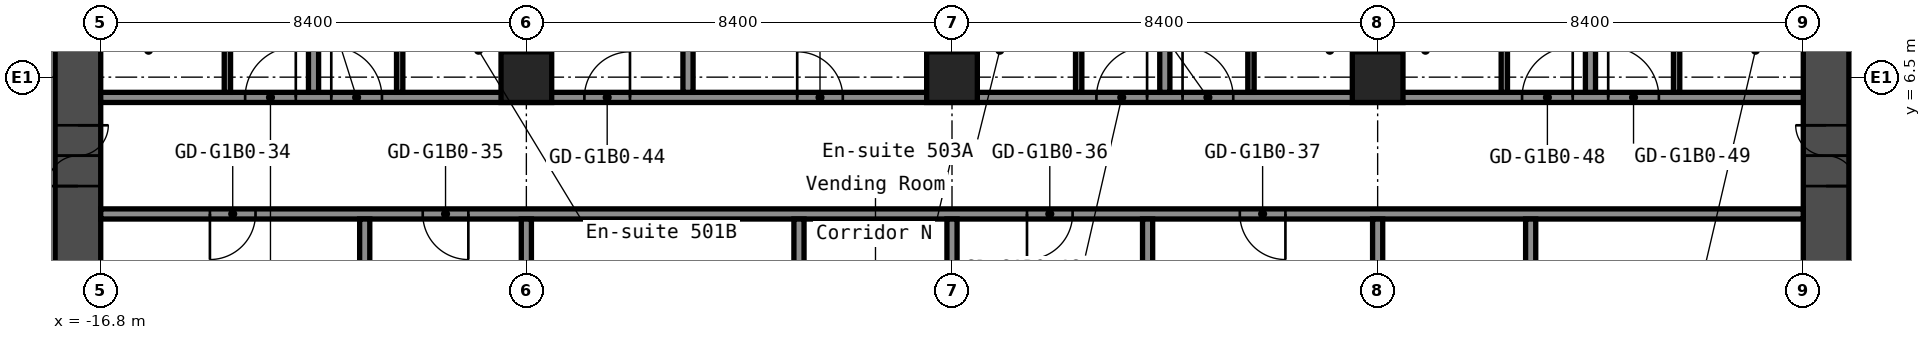
"""IFC4 building model, lengths in metres.
Left out: names, types, materials, properties, quantities, classifications, styles, units other than length and angle.
Written with IfcOpenShell. Run it as: python <this file> out.ifc"""

import sys

from ifc_helpers import new_model, si_unit, direction, frame, frame_2d, origin, origin_2d, place, context, subcontext, project, spatial, rectangle, hollow_rectangle, extrude, element, fill, save


model = new_model("IFC4")
c1 = context("Model", 3, precision=1e-05, world=origin(), true_north=direction((0.0, 1.0)))
c2 = subcontext(c1, "Body", "Model", "MODEL_VIEW")
j1 = project(units=[si_unit("LENGTHUNIT", "METRE"), si_unit("PLANEANGLEUNIT", "RADIAN")], contexts=[c1])
p1 = place(None, origin())
s1 = spatial("IfcSite", under=j1, at=p1, CompositionType="ELEMENT")
p2 = place(p1, origin())
s2 = spatial("IfcBuilding", under=s1, at=p2, CompositionType="ELEMENT")
p3 = place(p2, frame((0.0, 0.0, 23.0)))
s3 = spatial("IfcBuildingStorey", under=s2, at=p3, CompositionType="ELEMENT", Elevation=23.0)
for number, where, z_axis, x_axis in (
    (1, (-8.4, 6.5, 0.0), (0.0, 0.0, 1.0), (1.0, 0.0, 0.0)),
    (2, (0.0, 6.5, 0.0), (0.0, 0.0, 1.0), (1.0, 0.0, 0.0)),
    (3, (8.4, 6.5, 0.0), (0.0, 0.0, 1.0), (1.0, 0.0, 0.0)),
):
    element("IfcColumn", number, at=place(p3, frame(where, z_axis=z_axis, x_axis=x_axis)), inside=s3, PredefinedType="COLUMN", context=c2, shape_type="SweptSolid", body=[
        extrude(hollow_rectangle(XDim=1.0, YDim=1.0, WallThickness=0.04, at=origin_2d()), origin(), (0.0, 0.0, 1.0), 2.8),
    ])
p4 = place(p3, frame((-17.25, -8.4, 0.0), z_axis=(0.0, 0.0, 1.0), x_axis=(0.0, 1.0, 0.0)))
e4 = element("IfcWall", 4, at=p4, inside=s3, PredefinedType="SHEAR", context=c2, shape_type="SweptSolid", body=[
    extrude(rectangle(XDim=16.8, YDim=0.9, at=frame_2d((8.4, 0.0))), origin(), (0.0, 0.0, 1.0), 2.8),
])
p5 = place(p4, frame((12.75, 0.0, 0.0)))
e5 = element("IfcOpeningElement", 5, at=p5, cuts=e4, PredefinedType="OPENING", context=c2, shape_type="SweptSolid", body=[
    extrude(rectangle(XDim=1.2, YDim=2.1, at=frame_2d((0.6, 1.05))), frame((0.0, 0.46, 0.0), z_axis=(0.0, -1.0, 0.0), x_axis=(1.0, 0.0, 0.0)), (0.0, 0.0, 1.0), 0.92),
])
p6 = place(p4, frame((2.85, 0.0, 0.0)))
e6 = element("IfcOpeningElement", 6, at=p6, cuts=e4, PredefinedType="OPENING", context=c2, shape_type="SweptSolid", body=[
    extrude(rectangle(XDim=1.2, YDim=2.1, at=frame_2d((0.6, 1.05))), frame((0.0, 0.46, 0.0), z_axis=(0.0, -1.0, 0.0), x_axis=(1.0, 0.0, 0.0)), (0.0, 0.0, 1.0), 0.92),
])
p7 = place(p3, frame((17.25, -8.4, 0.0), z_axis=(0.0, 0.0, 1.0), x_axis=(0.0, 1.0, 0.0)))
e7 = element("IfcWall", 7, at=p7, inside=s3, PredefinedType="SHEAR", context=c2, shape_type="SweptSolid", body=[
    extrude(rectangle(XDim=16.8, YDim=0.9, at=frame_2d((8.4, 0.0))), origin(), (0.0, 0.0, 1.0), 2.8),
])
p8 = place(p7, frame((12.75, 0.0, 0.0)))
e8 = element("IfcOpeningElement", 8, at=p8, cuts=e7, PredefinedType="OPENING", context=c2, shape_type="SweptSolid", body=[
    extrude(rectangle(XDim=1.2, YDim=2.1, at=frame_2d((0.6, 1.05))), frame((0.0, 0.46, 0.0), z_axis=(0.0, -1.0, 0.0), x_axis=(1.0, 0.0, 0.0)), (0.0, 0.0, 1.0), 0.92),
])
p9 = place(p7, frame((2.85, 0.0, 0.0)))
e9 = element("IfcOpeningElement", 9, at=p9, cuts=e7, PredefinedType="OPENING", context=c2, shape_type="SweptSolid", body=[
    extrude(rectangle(XDim=1.2, YDim=2.1, at=frame_2d((0.6, 1.05))), frame((0.0, 0.46, 0.0), z_axis=(0.0, -1.0, 0.0), x_axis=(1.0, 0.0, 0.0)), (0.0, 0.0, 1.0), 0.92),
])
p10 = place(p3, frame((-16.8, 3.8, 0.0), z_axis=(0.0, 0.0, 1.0), x_axis=(1.0, 0.0, 0.0)))
e10 = element("IfcWall", 10, at=p10, inside=s3, PredefinedType="PARTITIONING", context=c2, shape_type="SweptSolid", body=[
    extrude(rectangle(XDim=33.6, YDim=0.2, at=frame_2d((16.8, 0.0))), origin(), (0.0, 0.0, 1.0), 2.8),
])
p11 = place(p10, frame((2.155, 0.0, 0.0)))
e11 = element("IfcOpeningElement", 11, at=p11, cuts=e10, PredefinedType="OPENING", context=c2, shape_type="SweptSolid", body=[
    extrude(rectangle(XDim=0.9, YDim=2.1, at=frame_2d((0.45, 1.05))), frame((0.0, 0.11, 0.0), z_axis=(0.0, -1.0, 0.0), x_axis=(1.0, 0.0, 0.0)), (0.0, 0.0, 1.0), 0.22),
])
p12 = place(p10, frame((6.355, 0.0, 0.0)))
e12 = element("IfcOpeningElement", 12, at=p12, cuts=e10, PredefinedType="OPENING", context=c2, shape_type="SweptSolid", body=[
    extrude(rectangle(XDim=0.9, YDim=2.1, at=frame_2d((0.45, 1.05))), frame((0.0, 0.11, 0.0), z_axis=(0.0, -1.0, 0.0), x_axis=(1.0, 0.0, 0.0)), (0.0, 0.0, 1.0), 0.22),
])
p13 = place(p10, frame((18.28, 0.0, 0.0)))
e13 = element("IfcOpeningElement", 13, at=p13, cuts=e10, PredefinedType="OPENING", context=c2, shape_type="SweptSolid", body=[
    extrude(rectangle(XDim=0.9, YDim=2.1, at=frame_2d((0.45, 1.05))), frame((0.0, 0.11, 0.0), z_axis=(0.0, -1.0, 0.0), x_axis=(1.0, 0.0, 0.0)), (0.0, 0.0, 1.0), 0.22),
])
p14 = place(p10, frame((22.48, 0.0, 0.0)))
e14 = element("IfcOpeningElement", 14, at=p14, cuts=e10, PredefinedType="OPENING", context=c2, shape_type="SweptSolid", body=[
    extrude(rectangle(XDim=0.9, YDim=2.1, at=frame_2d((0.45, 1.05))), frame((0.0, 0.11, 0.0), z_axis=(0.0, -1.0, 0.0), x_axis=(1.0, 0.0, 0.0)), (0.0, 0.0, 1.0), 0.22),
])
p15 = place(p3, frame((-16.8, 6.1, 0.0), z_axis=(0.0, 0.0, 1.0), x_axis=(1.0, 0.0, 0.0)))
e15 = element("IfcWall", 15, at=p15, inside=s3, PredefinedType="PARTITIONING", context=c2, shape_type="SweptSolid", body=[
    extrude(rectangle(XDim=33.6, YDim=0.2, at=frame_2d((16.8, 0.0))), origin(), (0.0, 0.0, 1.0), 2.8),
])
p16 = place(p15, frame((2.85, 0.0, 0.0)))
e16 = element("IfcOpeningElement", 16, at=p16, cuts=e15, PredefinedType="OPENING", context=c2, shape_type="SweptSolid", body=[
    extrude(rectangle(XDim=1.0, YDim=2.1, at=frame_2d((0.5, 1.05))), frame((0.0, 0.11, 0.0), z_axis=(0.0, -1.0, 0.0), x_axis=(1.0, 0.0, 0.0)), (0.0, 0.0, 1.0), 0.22),
])
p17 = place(p15, frame((4.55, 0.0, 0.0)))
e17 = element("IfcOpeningElement", 17, at=p17, cuts=e15, PredefinedType="OPENING", context=c2, shape_type="SweptSolid", body=[
    extrude(rectangle(XDim=1.0, YDim=2.1, at=frame_2d((0.5, 1.05))), frame((0.0, 0.11, 0.0), z_axis=(0.0, -1.0, 0.0), x_axis=(1.0, 0.0, 0.0)), (0.0, 0.0, 1.0), 0.22),
])
p18 = place(p15, frame((9.545, 0.0, 0.0)))
e18 = element("IfcOpeningElement", 18, at=p18, cuts=e15, PredefinedType="OPENING", context=c2, shape_type="SweptSolid", body=[
    extrude(rectangle(XDim=0.9, YDim=2.1, at=frame_2d((0.45, 1.05))), frame((0.0, 0.11, 0.0), z_axis=(0.0, -1.0, 0.0), x_axis=(1.0, 0.0, 0.0)), (0.0, 0.0, 1.0), 0.22),
])
p19 = place(p15, frame((13.745, 0.0, 0.0)))
e19 = element("IfcOpeningElement", 19, at=p19, cuts=e15, PredefinedType="OPENING", context=c2, shape_type="SweptSolid", body=[
    extrude(rectangle(XDim=0.9, YDim=2.1, at=frame_2d((0.45, 1.05))), frame((0.0, 0.11, 0.0), z_axis=(0.0, -1.0, 0.0), x_axis=(1.0, 0.0, 0.0)), (0.0, 0.0, 1.0), 0.22),
])
p20 = place(p15, frame((19.65, 0.0, 0.0)))
e20 = element("IfcOpeningElement", 20, at=p20, cuts=e15, PredefinedType="OPENING", context=c2, shape_type="SweptSolid", body=[
    extrude(rectangle(XDim=1.0, YDim=2.1, at=frame_2d((0.5, 1.05))), frame((0.0, 0.11, 0.0), z_axis=(0.0, -1.0, 0.0), x_axis=(1.0, 0.0, 0.0)), (0.0, 0.0, 1.0), 0.22),
])
p21 = place(p15, frame((21.35, 0.0, 0.0)))
e21 = element("IfcOpeningElement", 21, at=p21, cuts=e15, PredefinedType="OPENING", context=c2, shape_type="SweptSolid", body=[
    extrude(rectangle(XDim=1.0, YDim=2.1, at=frame_2d((0.5, 1.05))), frame((0.0, 0.11, 0.0), z_axis=(0.0, -1.0, 0.0), x_axis=(1.0, 0.0, 0.0)), (0.0, 0.0, 1.0), 0.22),
])
p22 = place(p15, frame((28.05, 0.0, 0.0)))
e22 = element("IfcOpeningElement", 22, at=p22, cuts=e15, PredefinedType="OPENING", context=c2, shape_type="SweptSolid", body=[
    extrude(rectangle(XDim=1.0, YDim=2.1, at=frame_2d((0.5, 1.05))), frame((0.0, 0.11, 0.0), z_axis=(0.0, -1.0, 0.0), x_axis=(1.0, 0.0, 0.0)), (0.0, 0.0, 1.0), 0.22),
])
p23 = place(p15, frame((29.75, 0.0, 0.0)))
e23 = element("IfcOpeningElement", 23, at=p23, cuts=e15, PredefinedType="OPENING", context=c2, shape_type="SweptSolid", body=[
    extrude(rectangle(XDim=1.0, YDim=2.1, at=frame_2d((0.5, 1.05))), frame((0.0, 0.11, 0.0), z_axis=(0.0, -1.0, 0.0), x_axis=(1.0, 0.0, 0.0)), (0.0, 0.0, 1.0), 0.22),
])
p24 = place(p3, frame((-14.3, 6.2, 0.0), z_axis=(0.0, 0.0, 1.0), x_axis=(0.0, 1.0, 0.0)))
e24 = element("IfcWall", 24, at=p24, inside=s3, PredefinedType="PARTITIONING", context=c2, shape_type="SweptSolid", body=[
    extrude(rectangle(XDim=2.9, YDim=0.125, at=frame_2d((1.45, 0.0))), origin(), (0.0, 0.0, 1.0), 2.8),
])
p25 = place(p24, frame((1.5, 0.0, 0.0)))
e25 = element("IfcOpeningElement", 25, at=p25, cuts=e24, PredefinedType="OPENING", context=c2, shape_type="SweptSolid", body=[
    extrude(rectangle(XDim=0.8, YDim=2.1, at=frame_2d((0.4, 1.05))), frame((0.0, 0.073, 0.0), z_axis=(0.0, -1.0, 0.0), x_axis=(1.0, 0.0, 0.0)), (0.0, 0.0, 1.0), 0.145),
])
p26 = place(p3, frame((-12.6, 6.2, 0.0), z_axis=(0.0, 0.0, 1.0), x_axis=(0.0, 1.0, 0.0)))
e26 = element("IfcWall", 26, at=p26, inside=s3, PredefinedType="PARTITIONING", context=c2, shape_type="SweptSolid", body=[
    extrude(rectangle(XDim=14.1, YDim=0.2, at=frame_2d((7.05, 0.0))), origin(), (0.0, 0.0, 1.0), 2.8),
])
p27 = place(p3, frame((-11.59, -3.7, 0.0), z_axis=(0.0, 0.0, 1.0), x_axis=(0.0, 1.0, 0.0)))
e27 = element("IfcWall", 27, at=p27, inside=s3, PredefinedType="PARTITIONING", context=c2, shape_type="SweptSolid", body=[
    extrude(rectangle(XDim=7.4, YDim=0.2, at=frame_2d((3.7, 0.0))), origin(), (0.0, 0.0, 1.0), 2.8),
])
p28 = place(p3, frame((-10.9, 6.2, 0.0), z_axis=(0.0, 0.0, 1.0), x_axis=(0.0, 1.0, 0.0)))
e28 = element("IfcWall", 28, at=p28, inside=s3, PredefinedType="PARTITIONING", context=c2, shape_type="SweptSolid", body=[
    extrude(rectangle(XDim=2.9, YDim=0.125, at=frame_2d((1.45, 0.0))), origin(), (0.0, 0.0, 1.0), 2.8),
])
p29 = place(p28, frame((1.5, 0.0, 0.0)))
e29 = element("IfcOpeningElement", 29, at=p29, cuts=e28, PredefinedType="OPENING", context=c2, shape_type="SweptSolid", body=[
    extrude(rectangle(XDim=0.8, YDim=2.1, at=frame_2d((0.4, 1.05))), frame((0.0, 0.073, 0.0), z_axis=(0.0, -1.0, 0.0), x_axis=(1.0, 0.0, 0.0)), (0.0, 0.0, 1.0), 0.145),
])
p30 = place(p3, frame((-8.4, -3.7, 0.0), z_axis=(0.0, 0.0, 1.0), x_axis=(0.0, 1.0, 0.0)))
e30 = element("IfcWall", 30, at=p30, inside=s3, PredefinedType="PARTITIONING", context=c2, shape_type="SweptSolid", body=[
    extrude(rectangle(XDim=7.4, YDim=0.2, at=frame_2d((3.7, 0.0))), origin(), (0.0, 0.0, 1.0), 2.8),
])
p31 = place(p3, frame((-8.4, 6.99, 0.0), z_axis=(0.0, 0.0, 1.0), x_axis=(0.0, 1.0, 0.0)))
e31 = element("IfcWall", 31, at=p31, inside=s3, PredefinedType="PARTITIONING", context=c2, shape_type="SweptSolid", body=[
    extrude(rectangle(XDim=13.31, YDim=0.2, at=frame_2d((6.655, 0.0))), origin(), (0.0, 0.0, 1.0), 2.8),
])
p32 = place(p3, frame((-5.21, 6.2, 0.0), z_axis=(0.0, 0.0, 1.0), x_axis=(0.0, 1.0, 0.0)))
e32 = element("IfcWall", 32, at=p32, inside=s3, PredefinedType="PARTITIONING", context=c2, shape_type="SweptSolid", body=[
    extrude(rectangle(XDim=14.1, YDim=0.2, at=frame_2d((7.05, 0.0))), origin(), (0.0, 0.0, 1.0), 2.8),
])
for number, where, z_axis, x_axis in (
    (33, (-3.02, -3.7, 0.0), (0.0, 0.0, 1.0), (0.0, 1.0, 0.0)),
    (34, (0.0, -3.7, 0.0), (0.0, 0.0, 1.0), (0.0, 1.0, 0.0)),
):
    element("IfcWall", number, at=place(p3, frame(where, z_axis=z_axis, x_axis=x_axis)), inside=s3, PredefinedType="PARTITIONING", context=c2, shape_type="SweptSolid", body=[
        extrude(rectangle(XDim=7.4, YDim=0.2, at=frame_2d((3.7, 0.0))), origin(), (0.0, 0.0, 1.0), 2.8),
    ])
p33 = place(p3, frame((0.0, 6.99, 0.0), z_axis=(0.0, 0.0, 1.0), x_axis=(0.0, 1.0, 0.0)))
e35 = element("IfcWall", 35, at=p33, inside=s3, PredefinedType="PARTITIONING", context=c2, shape_type="SweptSolid", body=[
    extrude(rectangle(XDim=13.31, YDim=0.2, at=frame_2d((6.655, 0.0))), origin(), (0.0, 0.0, 1.0), 2.8),
])
p34 = place(p3, frame((2.5, 6.2, 0.0), z_axis=(0.0, 0.0, 1.0), x_axis=(0.0, 1.0, 0.0)))
e36 = element("IfcWall", 36, at=p34, inside=s3, PredefinedType="PARTITIONING", context=c2, shape_type="SweptSolid", body=[
    extrude(rectangle(XDim=2.9, YDim=0.125, at=frame_2d((1.45, 0.0))), origin(), (0.0, 0.0, 1.0), 2.8),
])
p35 = place(p34, frame((1.5, 0.0, 0.0)))
e37 = element("IfcOpeningElement", 37, at=p35, cuts=e36, PredefinedType="OPENING", context=c2, shape_type="SweptSolid", body=[
    extrude(rectangle(XDim=0.8, YDim=2.1, at=frame_2d((0.4, 1.05))), frame((0.0, 0.073, 0.0), z_axis=(0.0, -1.0, 0.0), x_axis=(1.0, 0.0, 0.0)), (0.0, 0.0, 1.0), 0.145),
])
p36 = place(p3, frame((3.86, -3.7, 0.0), z_axis=(0.0, 0.0, 1.0), x_axis=(0.0, 1.0, 0.0)))
e38 = element("IfcWall", 38, at=p36, inside=s3, PredefinedType="PARTITIONING", context=c2, shape_type="SweptSolid", body=[
    extrude(rectangle(XDim=7.4, YDim=0.2, at=frame_2d((3.7, 0.0))), origin(), (0.0, 0.0, 1.0), 2.8),
])
p37 = place(p3, frame((4.2, 6.2, 0.0), z_axis=(0.0, 0.0, 1.0), x_axis=(0.0, 1.0, 0.0)))
e39 = element("IfcWall", 39, at=p37, inside=s3, PredefinedType="PARTITIONING", context=c2, shape_type="SweptSolid", body=[
    extrude(rectangle(XDim=14.1, YDim=0.2, at=frame_2d((7.05, 0.0))), origin(), (0.0, 0.0, 1.0), 2.8),
])
p38 = place(p3, frame((5.9, 6.2, 0.0), z_axis=(0.0, 0.0, 1.0), x_axis=(0.0, 1.0, 0.0)))
e40 = element("IfcWall", 40, at=p38, inside=s3, PredefinedType="PARTITIONING", context=c2, shape_type="SweptSolid", body=[
    extrude(rectangle(XDim=2.9, YDim=0.125, at=frame_2d((1.45, 0.0))), origin(), (0.0, 0.0, 1.0), 2.8),
])
p39 = place(p38, frame((1.5, 0.0, 0.0)))
e41 = element("IfcOpeningElement", 41, at=p39, cuts=e40, PredefinedType="OPENING", context=c2, shape_type="SweptSolid", body=[
    extrude(rectangle(XDim=0.8, YDim=2.1, at=frame_2d((0.4, 1.05))), frame((0.0, 0.073, 0.0), z_axis=(0.0, -1.0, 0.0), x_axis=(1.0, 0.0, 0.0)), (0.0, 0.0, 1.0), 0.145),
])
p40 = place(p3, frame((8.4, -3.7, 0.0), z_axis=(0.0, 0.0, 1.0), x_axis=(0.0, 1.0, 0.0)))
e42 = element("IfcWall", 42, at=p40, inside=s3, PredefinedType="PARTITIONING", context=c2, shape_type="SweptSolid", body=[
    extrude(rectangle(XDim=7.4, YDim=0.2, at=frame_2d((3.7, 0.0))), origin(), (0.0, 0.0, 1.0), 2.8),
])
p41 = place(p3, frame((8.4, 6.99, 0.0), z_axis=(0.0, 0.0, 1.0), x_axis=(0.0, 1.0, 0.0)))
e43 = element("IfcWall", 43, at=p41, inside=s3, PredefinedType="PARTITIONING", context=c2, shape_type="SweptSolid", body=[
    extrude(rectangle(XDim=13.31, YDim=0.2, at=frame_2d((6.655, 0.0))), origin(), (0.0, 0.0, 1.0), 2.8),
])
p42 = place(p3, frame((10.9, 6.2, 0.0), z_axis=(0.0, 0.0, 1.0), x_axis=(0.0, 1.0, 0.0)))
e44 = element("IfcWall", 44, at=p42, inside=s3, PredefinedType="PARTITIONING", context=c2, shape_type="SweptSolid", body=[
    extrude(rectangle(XDim=2.9, YDim=0.125, at=frame_2d((1.45, 0.0))), origin(), (0.0, 0.0, 1.0), 2.8),
])
p43 = place(p42, frame((1.5, 0.0, 0.0)))
e45 = element("IfcOpeningElement", 45, at=p43, cuts=e44, PredefinedType="OPENING", context=c2, shape_type="SweptSolid", body=[
    extrude(rectangle(XDim=0.8, YDim=2.1, at=frame_2d((0.4, 1.05))), frame((0.0, 0.073, 0.0), z_axis=(0.0, -1.0, 0.0), x_axis=(1.0, 0.0, 0.0)), (0.0, 0.0, 1.0), 0.145),
])
p44 = place(p3, frame((11.42, -3.7, 0.0), z_axis=(0.0, 0.0, 1.0), x_axis=(0.0, 1.0, 0.0)))
e46 = element("IfcWall", 46, at=p44, inside=s3, PredefinedType="PARTITIONING", context=c2, shape_type="SweptSolid", body=[
    extrude(rectangle(XDim=7.4, YDim=0.2, at=frame_2d((3.7, 0.0))), origin(), (0.0, 0.0, 1.0), 2.8),
])
p45 = place(p3, frame((12.6, 6.2, 0.0), z_axis=(0.0, 0.0, 1.0), x_axis=(0.0, 1.0, 0.0)))
e47 = element("IfcWall", 47, at=p45, inside=s3, PredefinedType="PARTITIONING", context=c2, shape_type="SweptSolid", body=[
    extrude(rectangle(XDim=14.1, YDim=0.2, at=frame_2d((7.05, 0.0))), origin(), (0.0, 0.0, 1.0), 2.8),
])
p46 = place(p3, frame((14.3, 6.2, 0.0), z_axis=(0.0, 0.0, 1.0), x_axis=(0.0, 1.0, 0.0)))
e48 = element("IfcWall", 48, at=p46, inside=s3, PredefinedType="PARTITIONING", context=c2, shape_type="SweptSolid", body=[
    extrude(rectangle(XDim=2.9, YDim=0.125, at=frame_2d((1.45, 0.0))), origin(), (0.0, 0.0, 1.0), 2.8),
])
p47 = place(p46, frame((1.5, 0.0, 0.0)))
e49 = element("IfcOpeningElement", 49, at=p47, cuts=e48, PredefinedType="OPENING", context=c2, shape_type="SweptSolid", body=[
    extrude(rectangle(XDim=0.8, YDim=2.1, at=frame_2d((0.4, 1.05))), frame((0.0, 0.073, 0.0), z_axis=(0.0, -1.0, 0.0), x_axis=(1.0, 0.0, 0.0)), (0.0, 0.0, 1.0), 0.145),
])
p48 = place(p5, origin())
e50 = element("IfcDoor", 50, at=p48, inside=s3, OperationType="DOUBLE_DOOR_SINGLE_SWING", PredefinedType="DOOR", context=c2, shape_type="SweptSolid", body=[
    extrude(rectangle(XDim=1.2, YDim=2.1, at=frame_2d((0.6, 1.05))), frame((0.0, 0.025, 0.0), z_axis=(0.0, -1.0, 0.0), x_axis=(1.0, 0.0, 0.0)), (0.0, 0.0, 1.0), 0.05),
])
fill(e5, e50)
p49 = place(p8, origin())
e51 = element("IfcDoor", 51, at=p49, inside=s3, OperationType="DOUBLE_DOOR_SINGLE_SWING", PredefinedType="DOOR", context=c2, shape_type="SweptSolid", body=[
    extrude(rectangle(XDim=1.2, YDim=2.1, at=frame_2d((0.6, 1.05))), frame((0.0, 0.025, 0.0), z_axis=(0.0, -1.0, 0.0), x_axis=(1.0, 0.0, 0.0)), (0.0, 0.0, 1.0), 0.05),
])
fill(e8, e51)
p50 = place(p11, origin())
e52 = element("IfcDoor", 52, at=p50, inside=s3, OperationType="SINGLE_SWING_LEFT", PredefinedType="DOOR", context=c2, shape_type="SweptSolid", body=[
    extrude(rectangle(XDim=0.9, YDim=2.1, at=frame_2d((0.45, 1.05))), frame((0.0, 0.025, 0.0), z_axis=(0.0, -1.0, 0.0), x_axis=(1.0, 0.0, 0.0)), (0.0, 0.0, 1.0), 0.05),
])
fill(e11, e52)
p51 = place(p12, origin())
e53 = element("IfcDoor", 53, at=p51, inside=s3, OperationType="SINGLE_SWING_RIGHT", PredefinedType="DOOR", context=c2, shape_type="SweptSolid", body=[
    extrude(rectangle(XDim=0.9, YDim=2.1, at=frame_2d((0.45, 1.05))), frame((0.0, 0.025, 0.0), z_axis=(0.0, -1.0, 0.0), x_axis=(1.0, 0.0, 0.0)), (0.0, 0.0, 1.0), 0.05),
])
fill(e12, e53)
p52 = place(p13, origin())
e54 = element("IfcDoor", 54, at=p52, inside=s3, OperationType="SINGLE_SWING_LEFT", PredefinedType="DOOR", context=c2, shape_type="SweptSolid", body=[
    extrude(rectangle(XDim=0.9, YDim=2.1, at=frame_2d((0.45, 1.05))), frame((0.0, 0.025, 0.0), z_axis=(0.0, -1.0, 0.0), x_axis=(1.0, 0.0, 0.0)), (0.0, 0.0, 1.0), 0.05),
])
fill(e13, e54)
p53 = place(p14, origin())
e55 = element("IfcDoor", 55, at=p53, inside=s3, OperationType="SINGLE_SWING_RIGHT", PredefinedType="DOOR", context=c2, shape_type="SweptSolid", body=[
    extrude(rectangle(XDim=0.9, YDim=2.1, at=frame_2d((0.45, 1.05))), frame((0.0, 0.025, 0.0), z_axis=(0.0, -1.0, 0.0), x_axis=(1.0, 0.0, 0.0)), (0.0, 0.0, 1.0), 0.05),
])
fill(e14, e55)
p54 = place(p16, origin())
e56 = element("IfcDoor", 56, at=p54, inside=s3, OperationType="SINGLE_SWING_LEFT", PredefinedType="DOOR", context=c2, shape_type="SweptSolid", body=[
    extrude(rectangle(XDim=1.0, YDim=2.1, at=frame_2d((0.5, 1.05))), frame((0.0, 0.025, 0.0), z_axis=(0.0, -1.0, 0.0), x_axis=(1.0, 0.0, 0.0)), (0.0, 0.0, 1.0), 0.05),
])
fill(e16, e56)
p55 = place(p17, origin())
e57 = element("IfcDoor", 57, at=p55, inside=s3, OperationType="SINGLE_SWING_RIGHT", PredefinedType="DOOR", context=c2, shape_type="SweptSolid", body=[
    extrude(rectangle(XDim=1.0, YDim=2.1, at=frame_2d((0.5, 1.05))), frame((0.0, 0.025, 0.0), z_axis=(0.0, -1.0, 0.0), x_axis=(1.0, 0.0, 0.0)), (0.0, 0.0, 1.0), 0.05),
])
fill(e17, e57)
p56 = place(p18, origin())
e58 = element("IfcDoor", 58, at=p56, inside=s3, OperationType="SINGLE_SWING_LEFT", PredefinedType="DOOR", context=c2, shape_type="SweptSolid", body=[
    extrude(rectangle(XDim=0.9, YDim=2.1, at=frame_2d((0.45, 1.05))), frame((0.0, 0.025, 0.0), z_axis=(0.0, -1.0, 0.0), x_axis=(1.0, 0.0, 0.0)), (0.0, 0.0, 1.0), 0.05),
])
fill(e18, e58)
p57 = place(p19, origin())
e59 = element("IfcDoor", 59, at=p57, inside=s3, OperationType="SINGLE_SWING_RIGHT", PredefinedType="DOOR", context=c2, shape_type="SweptSolid", body=[
    extrude(rectangle(XDim=0.9, YDim=2.1, at=frame_2d((0.45, 1.05))), frame((0.0, 0.025, 0.0), z_axis=(0.0, -1.0, 0.0), x_axis=(1.0, 0.0, 0.0)), (0.0, 0.0, 1.0), 0.05),
])
fill(e19, e59)
p58 = place(p20, origin())
e60 = element("IfcDoor", 60, at=p58, inside=s3, OperationType="SINGLE_SWING_LEFT", PredefinedType="DOOR", context=c2, shape_type="SweptSolid", body=[
    extrude(rectangle(XDim=1.0, YDim=2.1, at=frame_2d((0.5, 1.05))), frame((0.0, 0.025, 0.0), z_axis=(0.0, -1.0, 0.0), x_axis=(1.0, 0.0, 0.0)), (0.0, 0.0, 1.0), 0.05),
])
fill(e20, e60)
p59 = place(p21, origin())
e61 = element("IfcDoor", 61, at=p59, inside=s3, OperationType="SINGLE_SWING_RIGHT", PredefinedType="DOOR", context=c2, shape_type="SweptSolid", body=[
    extrude(rectangle(XDim=1.0, YDim=2.1, at=frame_2d((0.5, 1.05))), frame((0.0, 0.025, 0.0), z_axis=(0.0, -1.0, 0.0), x_axis=(1.0, 0.0, 0.0)), (0.0, 0.0, 1.0), 0.05),
])
fill(e21, e61)
p60 = place(p22, origin())
e62 = element("IfcDoor", 62, at=p60, inside=s3, OperationType="SINGLE_SWING_LEFT", PredefinedType="DOOR", context=c2, shape_type="SweptSolid", body=[
    extrude(rectangle(XDim=1.0, YDim=2.1, at=frame_2d((0.5, 1.05))), frame((0.0, 0.025, 0.0), z_axis=(0.0, -1.0, 0.0), x_axis=(1.0, 0.0, 0.0)), (0.0, 0.0, 1.0), 0.05),
])
fill(e22, e62)
p61 = place(p23, origin())
e63 = element("IfcDoor", 63, at=p61, inside=s3, OperationType="SINGLE_SWING_RIGHT", PredefinedType="DOOR", context=c2, shape_type="SweptSolid", body=[
    extrude(rectangle(XDim=1.0, YDim=2.1, at=frame_2d((0.5, 1.05))), frame((0.0, 0.025, 0.0), z_axis=(0.0, -1.0, 0.0), x_axis=(1.0, 0.0, 0.0)), (0.0, 0.0, 1.0), 0.05),
])
fill(e23, e63)
save(model, sys.argv[1])
